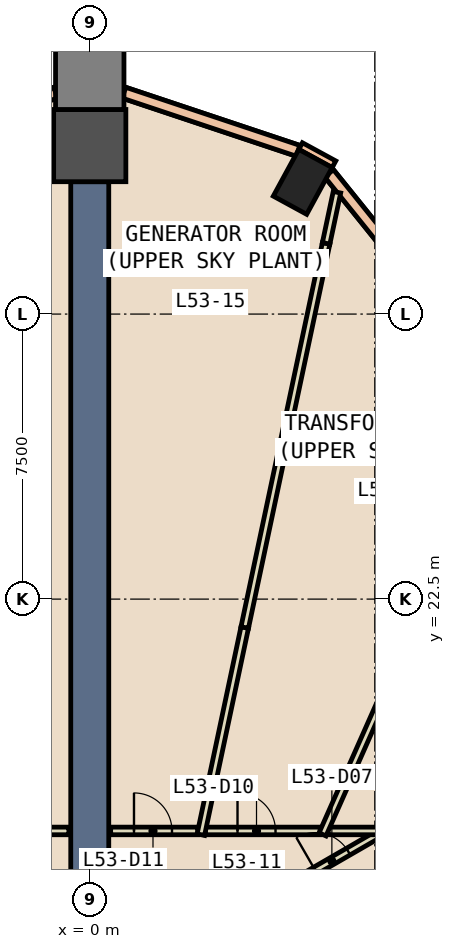
"""IFC4 building model, lengths in metres.
Left out: names, types, materials, properties, quantities, classifications, styles, units other than length and angle.
Written with IfcOpenShell. Run it as: python <this file> out.ifc"""

import sys

from ifc_helpers import new_model, si_unit, direction, frame, frame_2d, origin, origin_2d, place, context, subcontext, project, spatial, rectangle, extrude, element, fill, save


model = new_model("IFC4")
c1 = context("Model", 3, precision=1e-05, world=origin(), true_north=direction((0.0, 1.0)))
c2 = subcontext(c1, "Body", "Model", "MODEL_VIEW")
j1 = project(units=[si_unit("LENGTHUNIT", "METRE"), si_unit("PLANEANGLEUNIT", "RADIAN")], contexts=[c1])
p1 = place(None, origin())
s1 = spatial("IfcSite", under=j1, at=p1, CompositionType="ELEMENT")
p2 = place(p1, origin())
s2 = spatial("IfcBuilding", under=s1, at=p2, CompositionType="ELEMENT")
p3 = place(p2, frame((0.0, 0.0, 236.0)))
s3 = spatial("IfcBuildingStorey", under=s2, at=p3, CompositionType="ELEMENT", Elevation=236.0)
p4 = place(p3, frame((5.604, 33.479, -0.6), z_axis=(0.0, 0.0, 1.0), x_axis=(-0.878099915703, 0.478477311941, 0.0)))
e1 = element("IfcColumn", 1, at=p4, inside=s3, PredefinedType="COLUMN", context=c2, shape_type="SweptSolid", body=[
    extrude(rectangle(XDim=1.0, YDim=1.4, at=origin_2d()), origin(), (0.0, 0.0, 1.0), 5.4),
])
p5 = place(p3, frame((0.0, 34.433, -0.6), z_axis=(0.0, 0.0, 1.0), x_axis=(0.0, 1.0, 0.0)))
e2 = element("IfcColumn", 2, at=p5, inside=s3, PredefinedType="COLUMN", context=c2, shape_type="SweptSolid", body=[
    extrude(rectangle(XDim=1.9, YDim=1.9, at=origin_2d()), origin(), (0.0, 0.0, 1.0), 5.4),
])
p6 = place(p3, frame((0.0, 36.283, -0.6), z_axis=(0.0, 0.0, 1.0), x_axis=(0.0, 1.0, 0.0)))
e3 = element("IfcColumn", 3, at=p6, inside=s3, PredefinedType="COLUMN", context=c2, shape_type="SweptSolid", body=[
    extrude(rectangle(XDim=1.8, YDim=1.8, at=origin_2d()), origin(), (0.0, 0.0, 1.0), 5.4),
])
p7 = place(p3, frame((0.0, 14.0, 0.0), z_axis=(0.0, 0.0, 1.0), x_axis=(0.0, 1.0, 0.0)))
e4 = element("IfcWall", 4, at=p7, inside=s3, PredefinedType="SHEAR", context=c2, shape_type="SweptSolid", body=[
    extrude(rectangle(XDim=19.483, YDim=1.0, at=frame_2d((9.741, 0.0))), origin(), (0.0, 0.0, 1.0), 4.8),
])
p8 = place(p3, frame((6.426, 33.942, 0.0), z_axis=(0.0, 0.0, 1.0), x_axis=(-0.878250009632, 0.478201757191, 0.0)))
e5 = element("IfcWall", 5, at=p8, inside=s3, PredefinedType="STANDARD", context=c2, shape_type="SweptSolid", body=[
    extrude(rectangle(XDim=1.0, YDim=0.2, at=frame_2d((0.5, 0.0))), origin(), (0.0, 0.0, 1.0), 4.8),
])
p9 = place(p3, frame((9.27, 30.011, 0.0), z_axis=(0.0, 0.0, 1.0), x_axis=(-0.627115312033, 0.778926431323, 0.0)))
e6 = element("IfcWall", 6, at=p9, inside=s3, PredefinedType="STANDARD", context=c2, shape_type="SweptSolid", body=[
    extrude(rectangle(XDim=4.742, YDim=0.3, at=frame_2d((2.371, 0.0))), origin(), (0.0, 0.0, 1.0), 1.2),
])
p10 = place(p3, frame((9.27, 30.011, 4.0), z_axis=(0.0, 0.0, 1.0), x_axis=(-0.627115312033, 0.778926431323, 0.0)))
e7 = element("IfcWall", 7, at=p10, inside=s3, PredefinedType="STANDARD", context=c2, shape_type="SweptSolid", body=[
    extrude(rectangle(XDim=4.742, YDim=0.3, at=frame_2d((2.371, 0.0))), origin(), (0.0, 0.0, 1.0), 0.8),
])
p11 = place(p3, frame((5.481, 34.296, 0.0), z_axis=(0.0, 0.0, 1.0), x_axis=(-0.948577105871, 0.316546164433, 0.0)))
e8 = element("IfcWall", 8, at=p11, inside=s3, PredefinedType="STANDARD", context=c2, shape_type="SweptSolid", body=[
    extrude(rectangle(XDim=4.83, YDim=0.3, at=frame_2d((2.415, 0.0))), origin(), (0.0, 0.0, 1.0), 1.2),
])
p12 = place(p3, frame((5.481, 34.296, 4.0), z_axis=(0.0, 0.0, 1.0), x_axis=(-0.948577105871, 0.316546164433, 0.0)))
e9 = element("IfcWall", 9, at=p12, inside=s3, PredefinedType="STANDARD", context=c2, shape_type="SweptSolid", body=[
    extrude(rectangle(XDim=4.83, YDim=0.3, at=frame_2d((2.415, 0.0))), origin(), (0.0, 0.0, 1.0), 0.8),
])
p13 = place(p3, frame((-0.899, 35.825, 0.0), z_axis=(0.0, 0.0, 1.0), x_axis=(-0.948577105871, -0.316546164433, 0.0)))
e10 = element("IfcWall", 10, at=p13, inside=s3, PredefinedType="STANDARD", context=c2, shape_type="SweptSolid", body=[
    extrude(rectangle(XDim=4.83, YDim=0.3, at=frame_2d((2.415, 0.0))), origin(), (0.0, 0.0, 1.0), 1.2),
])
p14 = place(p3, frame((-0.899, 35.825, 4.0), z_axis=(0.0, 0.0, 1.0), x_axis=(-0.948577105871, -0.316546164433, 0.0)))
e11 = element("IfcWall", 11, at=p14, inside=s3, PredefinedType="STANDARD", context=c2, shape_type="SweptSolid", body=[
    extrude(rectangle(XDim=4.83, YDim=0.3, at=frame_2d((2.415, 0.0))), origin(), (0.0, 0.0, 1.0), 0.8),
])
p15 = place(p3, frame((5.79, 15.271, 0.0), z_axis=(0.0, 0.0, 1.0), x_axis=(0.866023505087, 0.500003288626, 0.0)))
e12 = element("IfcWall", 12, at=p15, inside=s3, PredefinedType="PARTITIONING", context=c2, shape_type="SweptSolid", body=[
    extrude(rectangle(XDim=2.358, YDim=0.2, at=frame_2d((1.179, 0.0))), origin(), (0.0, 0.0, 1.0), 4.8),
])
p16 = place(p15, frame((0.171, 0.0, 0.0)))
e13 = element("IfcOpeningElement", 13, at=p16, cuts=e12, PredefinedType="OPENING", context=c2, shape_type="SweptSolid", body=[
    extrude(rectangle(XDim=1.0, YDim=2.1, at=frame_2d((0.5, 1.05))), frame((0.0, 0.11, 0.0), z_axis=(0.0, -1.0, 0.0), x_axis=(1.0, 0.0, 0.0)), (0.0, 0.0, 1.0), 0.22),
])
p17 = place(p3, frame((6.266, 16.4, 0.0), z_axis=(0.0, 0.0, 1.0), x_axis=(1.0, 0.0, 0.0)))
e14 = element("IfcWall", 14, at=p17, inside=s3, PredefinedType="PARTITIONING", context=c2, shape_type="SweptSolid", body=[
    extrude(rectangle(XDim=1.479, YDim=0.2, at=frame_2d((0.74, 0.0))), origin(), (0.0, 0.0, 1.0), 4.8),
])
p18 = place(p3, frame((3.044, 16.4, 0.0), z_axis=(0.0, 0.0, 1.0), x_axis=(1.0, 0.0, 0.0)))
e15 = element("IfcWall", 15, at=p18, inside=s3, PredefinedType="PARTITIONING", context=c2, shape_type="SweptSolid", body=[
    extrude(rectangle(XDim=3.022, YDim=0.2, at=frame_2d((1.511, 0.0))), origin(), (0.0, 0.0, 1.0), 4.8),
])
p19 = place(p18, frame((0.844, 0.0, 0.0)))
e16 = element("IfcOpeningElement", 16, at=p19, cuts=e15, PredefinedType="OPENING", context=c2, shape_type="SweptSolid", body=[
    extrude(rectangle(XDim=1.0, YDim=2.1, at=frame_2d((0.5, 1.05))), frame((0.0, 0.11, 0.0), z_axis=(0.0, -1.0, 0.0), x_axis=(1.0, 0.0, 0.0)), (0.0, 0.0, 1.0), 0.22),
])
p20 = place(p3, frame((0.55, 16.4, 0.0), z_axis=(0.0, 0.0, 1.0), x_axis=(1.0, 0.0, 0.0)))
e17 = element("IfcWall", 17, at=p20, inside=s3, PredefinedType="PARTITIONING", context=c2, shape_type="SweptSolid", body=[
    extrude(rectangle(XDim=2.294, YDim=0.2, at=frame_2d((1.147, 0.0))), origin(), (0.0, 0.0, 1.0), 4.8),
])
p21 = place(p20, frame((0.614, 0.0, 0.0)))
e18 = element("IfcOpeningElement", 18, at=p21, cuts=e17, PredefinedType="OPENING", context=c2, shape_type="SweptSolid", body=[
    extrude(rectangle(XDim=1.0, YDim=2.1, at=frame_2d((0.5, 1.05))), frame((0.0, 0.11, 0.0), z_axis=(0.0, -1.0, 0.0), x_axis=(1.0, 0.0, 0.0)), (0.0, 0.0, 1.0), 0.22),
])
p22 = place(p3, frame((6.125, 16.309, 0.0), z_axis=(0.0, 0.0, 1.0), x_axis=(0.405480740136, 0.914103587882, 0.0)))
e19 = element("IfcWall", 19, at=p22, inside=s3, PredefinedType="PARTITIONING", context=c2, shape_type="SweptSolid", body=[
    extrude(rectangle(XDim=10.54, YDim=0.2, at=frame_2d((5.27, 0.0))), origin(), (0.0, 0.0, 1.0), 4.8),
])
p23 = place(p3, frame((2.923, 16.302, 0.0), z_axis=(0.0, 0.0, 1.0), x_axis=(0.207251352571, 0.97828772703, 0.0)))
e20 = element("IfcWall", 20, at=p23, inside=s3, PredefinedType="PARTITIONING", context=c2, shape_type="SweptSolid", body=[
    extrude(rectangle(XDim=5.572, YDim=0.2, at=frame_2d((2.786, 0.0))), origin(), (0.0, 0.0, 1.0), 2.4),
])
p24 = place(p3, frame((0.0, 35.403, 0.0), z_axis=(0.0, 0.0, 1.0), x_axis=(0.0, 1.0, 0.0)))
e21 = element("IfcWall", 21, at=p24, inside=s3, PredefinedType="PARTITIONING", context=c2, shape_type="SweptSolid", body=[
    extrude(rectangle(XDim=0.5, YDim=0.2, at=frame_2d((0.25, 0.0))), origin(), (0.0, 0.0, 1.0), 4.8),
])
p25 = place(p3, frame((4.078, 21.753, 0.0), z_axis=(0.0, 0.0, 1.0), x_axis=(0.207313040937, 0.978274656248, 0.0)))
e22 = element("IfcWall", 22, at=p25, inside=s3, PredefinedType="PARTITIONING", context=c2, shape_type="SweptSolid", body=[
    extrude(rectangle(XDim=10.333, YDim=0.2, at=frame_2d((5.166, 0.0))), origin(), (0.0, 0.0, 1.0), 4.8),
])
p26 = place(p3, frame((6.22, 31.861, 0.0), z_axis=(0.0, 0.0, 1.0), x_axis=(0.207236425439, 0.978290889241, 0.0)))
e23 = element("IfcWall", 23, at=p26, inside=s3, PredefinedType="PARTITIONING", context=c2, shape_type="SweptSolid", body=[
    extrude(rectangle(XDim=1.375, YDim=0.2, at=frame_2d((0.688, 0.0))), origin(), (0.0, 0.0, 1.0), 2.4),
])
p27 = place(p3, frame((-2.065, 16.4, 0.0), z_axis=(0.0, 0.0, 1.0), x_axis=(1.0, 0.0, 0.0)))
e24 = element("IfcWall", 24, at=p27, inside=s3, PredefinedType="PARTITIONING", context=c2, shape_type="SweptSolid", body=[
    extrude(rectangle(XDim=1.515, YDim=0.2, at=frame_2d((0.757, 0.0))), origin(), (0.0, 0.0, 1.0), 4.8),
])
p28 = place(p16, origin())
e25 = element("IfcDoor", 25, at=p28, inside=s3, OperationType="SINGLE_SWING_LEFT", PredefinedType="DOOR", context=c2, shape_type="SweptSolid", body=[
    extrude(rectangle(XDim=1.0, YDim=2.1, at=frame_2d((0.5, 1.05))), frame((0.0, 0.025, 0.0), z_axis=(0.0, -1.0, 0.0), x_axis=(1.0, 0.0, 0.0)), (0.0, 0.0, 1.0), 0.05),
])
fill(e13, e25)
p29 = place(p19, origin())
e26 = element("IfcDoor", 26, at=p29, inside=s3, OperationType="SINGLE_SWING_RIGHT", PredefinedType="DOOR", context=c2, shape_type="SweptSolid", body=[
    extrude(rectangle(XDim=1.0, YDim=2.1, at=frame_2d((0.5, 1.05))), frame((0.0, 0.025, 0.0), z_axis=(0.0, -1.0, 0.0), x_axis=(1.0, 0.0, 0.0)), (0.0, 0.0, 1.0), 0.05),
])
fill(e16, e26)
p30 = place(p21, origin())
e27 = element("IfcDoor", 27, at=p30, inside=s3, OperationType="SINGLE_SWING_LEFT", PredefinedType="DOOR", context=c2, shape_type="SweptSolid", body=[
    extrude(rectangle(XDim=1.0, YDim=2.1, at=frame_2d((0.5, 1.05))), frame((0.0, 0.025, 0.0), z_axis=(0.0, -1.0, 0.0), x_axis=(1.0, 0.0, 0.0)), (0.0, 0.0, 1.0), 0.05),
])
fill(e18, e27)
save(model, sys.argv[1])
